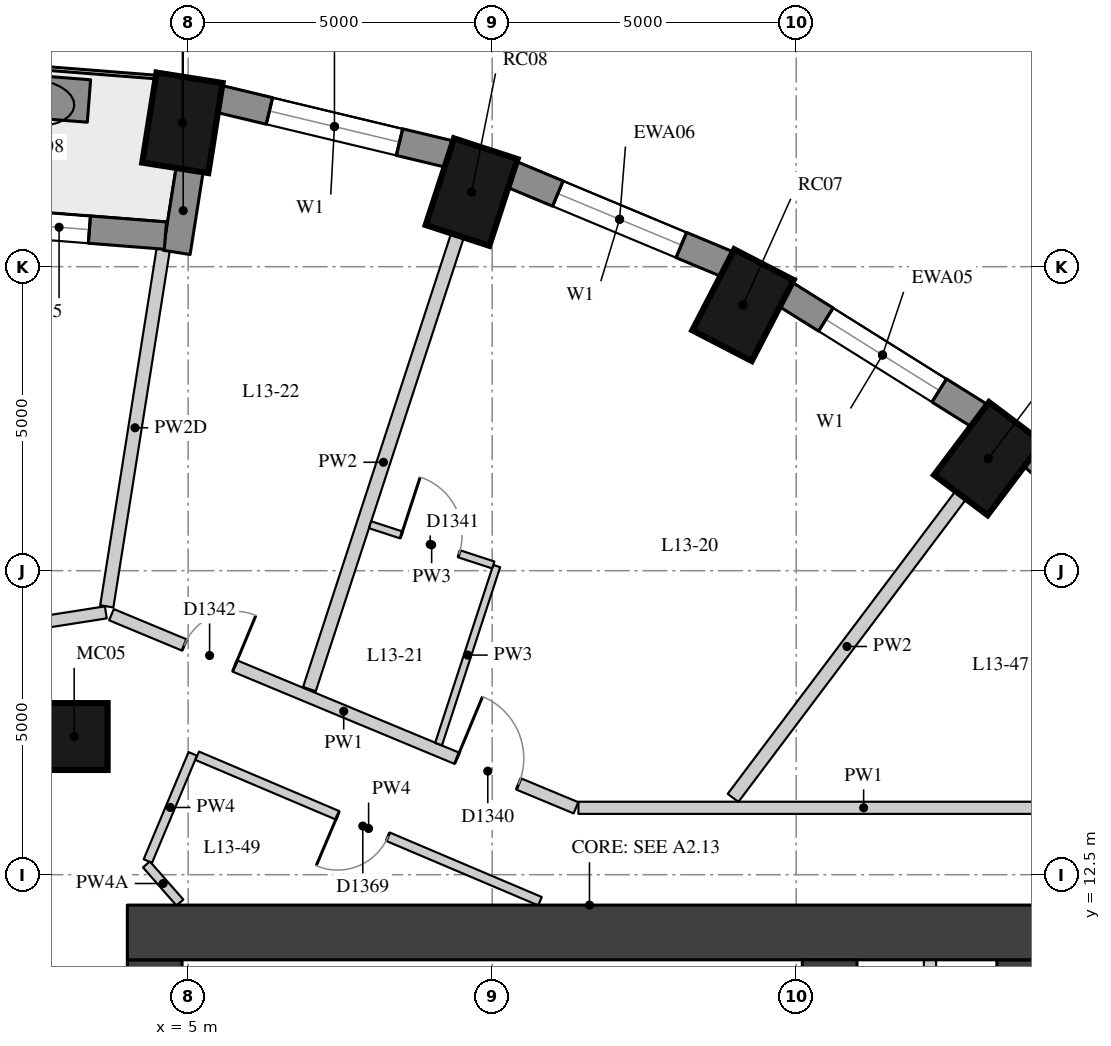
"""IFC4 building model, lengths in metres.
Left out: names, types, materials, properties, quantities, classifications, styles, units other than length and angle.
Written with IfcOpenShell. Run it as: python <this file> out.ifc"""

import sys

from ifc_helpers import new_model, si_unit, direction, frame, frame_2d, origin, origin_2d, place, context, subcontext, project, spatial, rectangle, extrude, element, fill, save


model = new_model("IFC4")
c1 = context("Model", 3, precision=1e-05, world=origin(), true_north=direction((0.0, 1.0)))
c2 = subcontext(c1, "Body", "Model", "MODEL_VIEW")
j1 = project(units=[si_unit("LENGTHUNIT", "METRE"), si_unit("PLANEANGLEUNIT", "RADIAN")], contexts=[c1])
p1 = place(None, origin())
s1 = spatial("IfcSite", under=j1, at=p1, CompositionType="ELEMENT")
p2 = place(p1, origin())
s2 = spatial("IfcBuilding", under=s1, at=p2, CompositionType="ELEMENT")
p3 = place(p2, frame((0.0, 0.0, 51.4)))
s3 = spatial("IfcBuildingStorey", under=s2, at=p3, CompositionType="ELEMENT", Elevation=51.4)
for number, where, z_axis, x_axis in (
    (1, (18.159, 19.343, 0.0), (0.0, 0.0, 1.0), (0.601, 0.799, 0.0)),
    (2, (14.125, 21.867, 0.0), (0.0, 0.0, 1.0), (0.46, 0.888, 0.0)),
    (3, (9.662, 23.727, 0.0), (0.0, 0.0, 1.0), (0.31, 0.951, 0.0)),
    (4, (4.906, 24.866, 0.0), (0.0, 0.0, 1.0), (0.156, 0.988, 0.0)),
):
    element("IfcColumn", number, at=place(p3, frame(where, z_axis=z_axis, x_axis=x_axis)), inside=s3, PredefinedType="COLUMN", context=c2, shape_type="SweptSolid", body=[
        extrude(rectangle(XDim=1.5, YDim=1.1, at=origin_2d()), origin(), (0.0, 0.0, 1.0), 3.3),
    ])
p4 = place(p3, frame((3.126, 14.772, 0.0), z_axis=(0.0, 0.0, 1.0), x_axis=(1.0, 0.0, 0.0)))
e5 = element("IfcColumn", 5, at=p4, inside=s3, PredefinedType="COLUMN", context=c2, shape_type="SweptSolid", body=[
    extrude(rectangle(XDim=1.1, YDim=1.1, at=origin_2d()), origin(), (0.0, 0.0, 1.0), 3.3),
])
p5 = place(p3, frame((21.627, 16.943, 0.0), z_axis=(0.0, 0.0, 1.0), x_axis=(-0.745526233716, 0.66647628228, 0.0)))
e6 = element("IfcWall", 6, at=p5, inside=s3, PredefinedType="SOLIDWALL", context=c2, shape_type="SweptSolid", body=[
    extrude(rectangle(XDim=3.697, YDim=0.45, at=frame_2d((1.848, 0.0))), origin(), (0.0, 0.0, 1.0), 3.02),
])
p6 = place(p3, frame((18.023, 20.044, 0.0), z_axis=(0.0, 0.0, 1.0), x_axis=(-0.847635480093, 0.530579016629, 0.0)))
e7 = element("IfcWall", 7, at=p6, inside=s3, PredefinedType="SOLIDWALL", context=c2, shape_type="SweptSolid", body=[
    extrude(rectangle(XDim=3.782, YDim=0.45, at=frame_2d((1.891, 0.0))), origin(), (0.0, 0.0, 1.0), 3.02),
])
p7 = place(p6, frame((0.791, 0.0, 0.4)))
e8 = element("IfcOpeningElement", 8, at=p7, cuts=e7, PredefinedType="OPENING", context=c2, shape_type="SweptSolid", body=[
    extrude(rectangle(XDim=2.2, YDim=1.75, at=frame_2d((1.1, 0.875))), frame((0.0, 0.235, 0.0), z_axis=(0.0, -1.0, 0.0), x_axis=(1.0, 0.0, 0.0)), (0.0, 0.0, 1.0), 0.47),
])
p8 = place(p3, frame((13.875, 22.537, 0.0), z_axis=(0.0, 0.0, 1.0), x_axis=(-0.923031964282, 0.384723267966, 0.0)))
e9 = element("IfcWall", 9, at=p8, inside=s3, PredefinedType="SOLIDWALL", context=c2, shape_type="SweptSolid", body=[
    extrude(rectangle(XDim=3.856, YDim=0.45, at=frame_2d((1.928, 0.0))), origin(), (0.0, 0.0, 1.0), 3.02),
])
p9 = place(p8, frame((0.828, 0.0, 0.4)))
e10 = element("IfcOpeningElement", 10, at=p9, cuts=e9, PredefinedType="OPENING", context=c2, shape_type="SweptSolid", body=[
    extrude(rectangle(XDim=2.2, YDim=1.75, at=frame_2d((1.1, 0.875))), frame((0.0, 0.235, 0.0), z_axis=(0.0, -1.0, 0.0), x_axis=(1.0, 0.0, 0.0)), (0.0, 0.0, 1.0), 0.47),
])
p10 = place(p3, frame((9.308, 24.35, 0.0), z_axis=(0.0, 0.0, 1.0), x_axis=(-0.972496561493, 0.232917233979, 0.0)))
e11 = element("IfcWall", 11, at=p10, inside=s3, PredefinedType="SOLIDWALL", context=c2, shape_type="SweptSolid", body=[
    extrude(rectangle(XDim=3.911, YDim=0.45, at=frame_2d((1.956, 0.0))), origin(), (0.0, 0.0, 1.0), 3.02),
])
p11 = place(p10, frame((0.855, 0.0, 0.4)))
e12 = element("IfcOpeningElement", 12, at=p11, cuts=e11, PredefinedType="OPENING", context=c2, shape_type="SweptSolid", body=[
    extrude(rectangle(XDim=2.2, YDim=1.75, at=frame_2d((1.1, 0.875))), frame((0.0, 0.235, 0.0), z_axis=(0.0, -1.0, 0.0), x_axis=(1.0, 0.0, 0.0)), (0.0, 0.0, 1.0), 0.47),
])
p12 = place(p3, frame((5.027, 24.108, 0.0), z_axis=(0.0, 0.0, 1.0), x_axis=(-0.156133927791, -0.98773589415, 0.0)))
e13 = element("IfcWall", 13, at=p12, inside=s3, PredefinedType="SOLIDWALL", context=c2, shape_type="SweptSolid", body=[
    extrude(rectangle(XDim=1.39, YDim=0.45, at=frame_2d((0.695, 0.0))), origin(), (0.0, 0.0, 1.0), 2.47),
])
p13 = place(p3, frame((4.626, 23.011, 0.0), z_axis=(0.0, 0.0, 1.0), x_axis=(-0.996937095772, 0.078207589615, 0.0)))
e14 = element("IfcWall", 14, at=p13, inside=s3, PredefinedType="SOLIDWALL", context=c2, shape_type="SweptSolid", body=[
    extrude(rectangle(XDim=4.657, YDim=0.45, at=frame_2d((2.329, 0.0))), origin(), (0.0, 0.0, 1.0), 3.02),
])
p14 = place(p13, frame((1.254, 0.0, 0.4)))
e15 = element("IfcOpeningElement", 15, at=p14, cuts=e14, PredefinedType="OPENING", context=c2, shape_type="SweptSolid", body=[
    extrude(rectangle(XDim=1.0, YDim=1.75, at=frame_2d((0.5, 0.875))), frame((0.0, 0.235, 0.0), z_axis=(0.0, -1.0, 0.0), x_axis=(1.0, 0.0, 0.0)), (0.0, 0.0, 1.0), 0.47),
])
p15 = place(p13, frame((2.404, 0.0, 0.0)))
e16 = element("IfcOpeningElement", 16, at=p15, cuts=e14, PredefinedType="OPENING", context=c2, shape_type="SweptSolid", body=[
    extrude(rectangle(XDim=1.0, YDim=2.15, at=frame_2d((0.5, 1.075))), frame((0.0, 0.235, 0.0), z_axis=(0.0, -1.0, 0.0), x_axis=(1.0, 0.0, 0.0)), (0.0, 0.0, 1.0), 0.47),
])
p16 = place(p3, frame((3.369, 25.225, 0.0), z_axis=(0.0, 0.0, 1.0), x_axis=(-0.996965267018, 0.077847648384, 0.0)))
e17 = element("IfcWall", 17, at=p16, inside=s3, PredefinedType="USERDEFINED", context=c2, shape_type="SweptSolid", body=[
    extrude(rectangle(XDim=1.8, YDim=0.7, at=frame_2d((0.9, 0.0))), origin(), (0.0, 0.0, 1.0), 0.75),
])
p17 = place(p3, frame((4.45, -11.1, 0.0), z_axis=(0.0, 0.0, 1.0), x_axis=(0.0, 1.0, 0.0)))
e18 = element("IfcWall", 18, at=p17, inside=s3, PredefinedType="SHEAR", context=c2, shape_type="SweptSolid", body=[
    extrude(rectangle(XDim=22.2, YDim=0.9, at=frame_2d((11.1, 0.0))), origin(), (0.0, 0.0, 1.0), 3.02),
])
p18 = place(p17, frame((2.35, 0.0, 0.0)))
e19 = element("IfcOpeningElement", 19, at=p18, cuts=e18, PredefinedType="OPENING", context=c2, shape_type="SweptSolid", body=[
    extrude(rectangle(XDim=1.5, YDim=2.1, at=frame_2d((0.75, 1.05))), frame((0.0, 0.46, 0.0), z_axis=(0.0, -1.0, 0.0), x_axis=(1.0, 0.0, 0.0)), (0.0, 0.0, 1.0), 0.92),
])
p19 = place(p17, frame((5.45, 0.0, 0.0)))
e20 = element("IfcOpeningElement", 20, at=p19, cuts=e18, PredefinedType="OPENING", context=c2, shape_type="SweptSolid", body=[
    extrude(rectangle(XDim=1.8, YDim=2.1, at=frame_2d((0.9, 1.05))), frame((0.0, 0.46, 0.0), z_axis=(0.0, -1.0, 0.0), x_axis=(1.0, 0.0, 0.0)), (0.0, 0.0, 1.0), 0.92),
])
p20 = place(p17, frame((7.95, 0.0, 0.0)))
e21 = element("IfcOpeningElement", 21, at=p20, cuts=e18, PredefinedType="OPENING", context=c2, shape_type="SweptSolid", body=[
    extrude(rectangle(XDim=1.1, YDim=2.1, at=frame_2d((0.55, 1.05))), frame((0.0, 0.46, 0.0), z_axis=(0.0, -1.0, 0.0), x_axis=(1.0, 0.0, 0.0)), (0.0, 0.0, 1.0), 0.92),
])
p21 = place(p17, frame((10.6, 0.0, 0.0)))
e22 = element("IfcOpeningElement", 22, at=p21, cuts=e18, PredefinedType="OPENING", context=c2, shape_type="SweptSolid", body=[
    extrude(rectangle(XDim=1.0, YDim=2.1, at=frame_2d((0.5, 1.05))), frame((0.0, 0.46, 0.0), z_axis=(0.0, -1.0, 0.0), x_axis=(1.0, 0.0, 0.0)), (0.0, 0.0, 1.0), 0.92),
])
p22 = place(p17, frame((13.15, 0.0, 0.0)))
e23 = element("IfcOpeningElement", 23, at=p22, cuts=e18, PredefinedType="OPENING", context=c2, shape_type="SweptSolid", body=[
    extrude(rectangle(XDim=1.1, YDim=2.1, at=frame_2d((0.55, 1.05))), frame((0.0, 0.46, 0.0), z_axis=(0.0, -1.0, 0.0), x_axis=(1.0, 0.0, 0.0)), (0.0, 0.0, 1.0), 0.92),
])
p23 = place(p17, frame((14.95, 0.0, 0.0)))
e24 = element("IfcOpeningElement", 24, at=p23, cuts=e18, PredefinedType="OPENING", context=c2, shape_type="SweptSolid", body=[
    extrude(rectangle(XDim=1.8, YDim=2.1, at=frame_2d((0.9, 1.05))), frame((0.0, 0.46, 0.0), z_axis=(0.0, -1.0, 0.0), x_axis=(1.0, 0.0, 0.0)), (0.0, 0.0, 1.0), 0.92),
])
p24 = place(p17, frame((18.35, 0.0, 0.0)))
e25 = element("IfcOpeningElement", 25, at=p24, cuts=e18, PredefinedType="OPENING", context=c2, shape_type="SweptSolid", body=[
    extrude(rectangle(XDim=1.5, YDim=2.1, at=frame_2d((0.75, 1.05))), frame((0.0, 0.46, 0.0), z_axis=(0.0, -1.0, 0.0), x_axis=(1.0, 0.0, 0.0)), (0.0, 0.0, 1.0), 0.92),
])
p25 = place(p3, frame((18.75, -11.1, 0.0), z_axis=(0.0, 0.0, 1.0), x_axis=(0.0, 1.0, 0.0)))
e26 = element("IfcWall", 26, at=p25, inside=s3, PredefinedType="SHEAR", context=c2, shape_type="SweptSolid", body=[
    extrude(rectangle(XDim=22.2, YDim=0.9, at=frame_2d((11.1, 0.0))), origin(), (0.0, 0.0, 1.0), 3.02),
])
p26 = place(p25, frame((15.925, 0.0, 0.0)))
e27 = element("IfcOpeningElement", 27, at=p26, cuts=e26, PredefinedType="OPENING", context=c2, shape_type="SweptSolid", body=[
    extrude(rectangle(XDim=1.5, YDim=2.1, at=frame_2d((0.75, 1.05))), frame((0.0, 0.46, 0.0), z_axis=(0.0, -1.0, 0.0), x_axis=(1.0, 0.0, 0.0)), (0.0, 0.0, 1.0), 0.92),
])
p27 = place(p25, frame((4.525, 0.0, 0.0)))
e28 = element("IfcOpeningElement", 28, at=p27, cuts=e26, PredefinedType="OPENING", context=c2, shape_type="SweptSolid", body=[
    extrude(rectangle(XDim=1.5, YDim=2.1, at=frame_2d((0.75, 1.05))), frame((0.0, 0.46, 0.0), z_axis=(0.0, -1.0, 0.0), x_axis=(1.0, 0.0, 0.0)), (0.0, 0.0, 1.0), 0.92),
])
p28 = place(p3, frame((4.0, 11.55, 0.0), z_axis=(0.0, 0.0, 1.0), x_axis=(1.0, 0.0, 0.0)))
e29 = element("IfcWall", 29, at=p28, inside=s3, PredefinedType="SHEAR", context=c2, shape_type="SweptSolid", body=[
    extrude(rectangle(XDim=15.2, YDim=0.9, at=frame_2d((7.6, 0.0))), origin(), (0.0, 0.0, 1.0), 3.02),
])
p29 = place(p3, frame((15.55, -11.1, 0.0), z_axis=(0.0, 0.0, 1.0), x_axis=(0.0, 1.0, 0.0)))
e30 = element("IfcWall", 30, at=p29, inside=s3, PredefinedType="SHEAR", context=c2, shape_type="SweptSolid", body=[
    extrude(rectangle(XDim=22.2, YDim=0.9, at=frame_2d((11.1, 0.0))), origin(), (0.0, 0.0, 1.0), 3.02),
])
p30 = place(p29, frame((15.6, 0.0, 0.0)))
e31 = element("IfcOpeningElement", 31, at=p30, cuts=e30, PredefinedType="OPENING", context=c2, shape_type="SweptSolid", body=[
    extrude(rectangle(XDim=1.0, YDim=2.1, at=frame_2d((0.5, 1.05))), frame((0.0, 0.46, 0.0), z_axis=(0.0, -1.0, 0.0), x_axis=(1.0, 0.0, 0.0)), (0.0, 0.0, 1.0), 0.92),
])
p31 = place(p29, frame((5.6, 0.0, 0.0)))
e32 = element("IfcOpeningElement", 32, at=p31, cuts=e30, PredefinedType="OPENING", context=c2, shape_type="SweptSolid", body=[
    extrude(rectangle(XDim=1.0, YDim=2.1, at=frame_2d((0.5, 1.05))), frame((0.0, 0.46, 0.0), z_axis=(0.0, -1.0, 0.0), x_axis=(1.0, 0.0, 0.0)), (0.0, 0.0, 1.0), 0.92),
])
p32 = place(p3, frame((17.2, 6.9, 0.0), z_axis=(0.0, 0.0, 1.0), x_axis=(0.0, 1.0, 0.0)))
e33 = element("IfcWall", 33, at=p32, inside=s3, PredefinedType="PARTITIONING", context=c2, shape_type="SweptSolid", body=[
    extrude(rectangle(XDim=4.2, YDim=0.2, at=frame_2d((2.1, 0.0))), origin(), (0.0, 0.0, 1.0), 3.02),
])
p33 = place(p3, frame((-7.234, 15.11, 0.0), z_axis=(0.0, 0.0, 1.0), x_axis=(0.987957763282, 0.154723811906, 0.0)))
e34 = element("IfcWall", 34, at=p33, inside=s3, PredefinedType="PARTITIONING", context=c2, shape_type="SweptSolid", body=[
    extrude(rectangle(XDim=11.012, YDim=0.2, at=frame_2d((5.506, 0.0))), origin(), (0.0, 0.0, 1.0), 3.02),
])
p34 = place(p33, frame((8.605, 0.0, 0.0)))
e35 = element("IfcOpeningElement", 35, at=p34, cuts=e34, PredefinedType="OPENING", context=c2, shape_type="SweptSolid", body=[
    extrude(rectangle(XDim=0.9, YDim=2.1, at=frame_2d((0.45, 1.05))), frame((0.0, 0.11, 0.0), z_axis=(0.0, -1.0, 0.0), x_axis=(1.0, 0.0, 0.0)), (0.0, 0.0, 1.0), 0.22),
])
p35 = place(p33, frame((5.116, 0.0, 0.0)))
e36 = element("IfcOpeningElement", 36, at=p35, cuts=e34, PredefinedType="OPENING", context=c2, shape_type="SweptSolid", body=[
    extrude(rectangle(XDim=0.9, YDim=2.1, at=frame_2d((0.45, 1.05))), frame((0.0, 0.11, 0.0), z_axis=(0.0, -1.0, 0.0), x_axis=(1.0, 0.0, 0.0)), (0.0, 0.0, 1.0), 0.22),
])
p36 = place(p33, frame((1.626, 0.0, 0.0)))
e37 = element("IfcOpeningElement", 37, at=p36, cuts=e34, PredefinedType="OPENING", context=c2, shape_type="SweptSolid", body=[
    extrude(rectangle(XDim=0.9, YDim=2.1, at=frame_2d((0.45, 1.05))), frame((0.0, 0.11, 0.0), z_axis=(0.0, -1.0, 0.0), x_axis=(1.0, 0.0, 0.0)), (0.0, 0.0, 1.0), 0.22),
])
p37 = place(p3, frame((3.739, 16.776, 0.0), z_axis=(0.0, 0.0, 1.0), x_axis=(0.923364778497, -0.383923802117, 0.0)))
e38 = element("IfcWall", 38, at=p37, inside=s3, PredefinedType="PARTITIONING", context=c2, shape_type="SweptSolid", body=[
    extrude(rectangle(XDim=8.273, YDim=0.2, at=frame_2d((4.137, 0.0))), origin(), (0.0, 0.0, 1.0), 3.02),
])
p38 = place(p37, frame((6.153, 0.0, 0.0)))
e39 = element("IfcOpeningElement", 39, at=p38, cuts=e38, PredefinedType="OPENING", context=c2, shape_type="SweptSolid", body=[
    extrude(rectangle(XDim=1.1, YDim=2.1, at=frame_2d((0.55, 1.05))), frame((0.0, 0.11, 0.0), z_axis=(0.0, -1.0, 0.0), x_axis=(1.0, 0.0, 0.0)), (0.0, 0.0, 1.0), 0.22),
])
p39 = place(p37, frame((1.298, 0.0, 0.0)))
e40 = element("IfcOpeningElement", 40, at=p39, cuts=e38, PredefinedType="OPENING", context=c2, shape_type="SweptSolid", body=[
    extrude(rectangle(XDim=0.9, YDim=2.1, at=frame_2d((0.45, 1.05))), frame((0.0, 0.11, 0.0), z_axis=(0.0, -1.0, 0.0), x_axis=(1.0, 0.0, 0.0)), (0.0, 0.0, 1.0), 0.22),
])
p40 = place(p3, frame((11.418, 13.6, 0.0), z_axis=(0.0, 0.0, 1.0), x_axis=(1.0, 0.0, 0.0)))
e41 = element("IfcWall", 41, at=p40, inside=s3, PredefinedType="PARTITIONING", context=c2, shape_type="SweptSolid", body=[
    extrude(rectangle(XDim=9.382, YDim=0.2, at=frame_2d((4.691, 0.0))), origin(), (0.0, 0.0, 1.0), 3.02),
])
p41 = place(p3, frame((4.865, 12.042, 0.0), z_axis=(0.0, 0.0, 1.0), x_axis=(-0.660014599896, 0.751252772323, 0.0)))
e42 = element("IfcWall", 42, at=p41, inside=s3, PredefinedType="PARTITIONING", context=c2, shape_type="SweptSolid", body=[
    extrude(rectangle(XDim=0.835, YDim=0.15, at=frame_2d((0.417, 0.0))), origin(), (0.0, 0.0, 1.0), 2.57),
])
p42 = place(p3, frame((4.337, 12.724, 0.0), z_axis=(0.0, 0.0, 1.0), x_axis=(0.386537433901, 0.922273718694, 0.0)))
e43 = element("IfcWall", 43, at=p42, inside=s3, PredefinedType="PARTITIONING", context=c2, shape_type="SweptSolid", body=[
    extrude(rectangle(XDim=1.911, YDim=0.15, at=frame_2d((0.956, 0.0))), origin(), (0.0, 0.0, 1.0), 3.02),
])
p43 = place(p3, frame((5.149, 14.456, 0.0), z_axis=(0.0, 0.0, 1.0), x_axis=(0.920541383735, -0.390645057348, 0.0)))
e44 = element("IfcWall", 44, at=p43, inside=s3, PredefinedType="PARTITIONING", context=c2, shape_type="SweptSolid", body=[
    extrude(rectangle(XDim=6.124, YDim=0.15, at=frame_2d((3.062, 0.0))), origin(), (0.0, 0.0, 1.0), 3.02),
])
p44 = place(p43, frame((2.508, 0.0, 0.0)))
e45 = element("IfcOpeningElement", 45, at=p44, cuts=e44, PredefinedType="OPENING", context=c2, shape_type="SweptSolid", body=[
    extrude(rectangle(XDim=0.9, YDim=2.1, at=frame_2d((0.45, 1.05))), frame((0.0, 0.085, 0.0), z_axis=(0.0, -1.0, 0.0), x_axis=(1.0, 0.0, 0.0)), (0.0, 0.0, 1.0), 0.17),
])
p45 = place(p3, frame((17.708, 18.743, 0.0), z_axis=(0.0, 0.0, 1.0), x_axis=(-0.601177883261, -0.799115231164, 0.0)))
e46 = element("IfcWall", 46, at=p45, inside=s3, PredefinedType="PARTITIONING", context=c2, shape_type="SweptSolid", body=[
    extrude(rectangle(XDim=6.231, YDim=0.22, at=frame_2d((3.116, 0.0))), origin(), (0.0, 0.0, 1.0), 3.02),
])
p46 = place(p3, frame((9.429, 23.014, 0.0), z_axis=(0.0, 0.0, 1.0), x_axis=(-0.310230839568, -0.950661257326, 0.0)))
e47 = element("IfcWall", 47, at=p46, inside=s3, PredefinedType="PARTITIONING", context=c2, shape_type="SweptSolid", body=[
    extrude(rectangle(XDim=7.849, YDim=0.22, at=frame_2d((3.925, 0.0))), origin(), (0.0, 0.0, 1.0), 3.02),
])
p47 = place(p3, frame((4.591, 22.789, 0.0), z_axis=(0.0, 0.0, 1.0), x_axis=(-0.156126964527, -0.987736994826, 0.0)))
e48 = element("IfcWall", 48, at=p47, inside=s3, PredefinedType="PARTITIONING", context=c2, shape_type="SweptSolid", body=[
    extrude(rectangle(XDim=5.948, YDim=0.22, at=frame_2d((2.974, 0.0))), origin(), (0.0, 0.0, 1.0), 2.47),
])
p48 = place(p3, frame((9.118, 14.648, 0.0), z_axis=(0.0, 0.0, 1.0), x_axis=(0.310277544614, 0.950646014723, 0.0)))
e49 = element("IfcWall", 49, at=p48, inside=s3, PredefinedType="PARTITIONING", context=c2, shape_type="SweptSolid", body=[
    extrude(rectangle(XDim=3.081, YDim=0.12, at=frame_2d((1.54, 0.0))), origin(), (0.0, 0.0, 1.0), 3.02),
])
p49 = place(p3, frame((10.017, 17.594, 0.0), z_axis=(0.0, 0.0, 1.0), x_axis=(-0.950613738429, 0.310376417129, 0.0)))
e50 = element("IfcWall", 50, at=p49, inside=s3, PredefinedType="PARTITIONING", context=c2, shape_type="SweptSolid", body=[
    extrude(rectangle(XDim=2.13, YDim=0.12, at=frame_2d((1.065, 0.0))), origin(), (0.0, 0.0, 1.0), 3.02),
])
p50 = place(p49, frame((0.59, 0.0, 0.0)))
e51 = element("IfcOpeningElement", 51, at=p50, cuts=e50, PredefinedType="OPENING", context=c2, shape_type="SweptSolid", body=[
    extrude(rectangle(XDim=1.0, YDim=2.1, at=frame_2d((0.5, 1.05))), frame((0.0, 0.07, 0.0), z_axis=(0.0, -1.0, 0.0), x_axis=(1.0, 0.0, 0.0)), (0.0, 0.0, 1.0), 0.14),
])
p51 = place(p7, origin())
e52 = element("IfcWindow", 52, at=p51, inside=s3, PartitioningType="SINGLE_PANEL", PredefinedType="WINDOW", context=c2, shape_type="SweptSolid", body=[
    extrude(rectangle(XDim=2.2, YDim=1.75, at=frame_2d((1.1, 0.875))), frame((0.0, 0.035, 0.0), z_axis=(0.0, -1.0, 0.0), x_axis=(1.0, 0.0, 0.0)), (0.0, 0.0, 1.0), 0.06),
])
fill(e8, e52)
p52 = place(p9, origin())
e53 = element("IfcWindow", 53, at=p52, inside=s3, PartitioningType="SINGLE_PANEL", PredefinedType="WINDOW", context=c2, shape_type="SweptSolid", body=[
    extrude(rectangle(XDim=2.2, YDim=1.75, at=frame_2d((1.1, 0.875))), frame((0.0, 0.035, 0.0), z_axis=(0.0, -1.0, 0.0), x_axis=(1.0, 0.0, 0.0)), (0.0, 0.0, 1.0), 0.06),
])
fill(e10, e53)
p53 = place(p11, origin())
e54 = element("IfcWindow", 54, at=p53, inside=s3, PartitioningType="SINGLE_PANEL", PredefinedType="WINDOW", context=c2, shape_type="SweptSolid", body=[
    extrude(rectangle(XDim=2.2, YDim=1.75, at=frame_2d((1.1, 0.875))), frame((0.0, 0.035, 0.0), z_axis=(0.0, -1.0, 0.0), x_axis=(1.0, 0.0, 0.0)), (0.0, 0.0, 1.0), 0.06),
])
fill(e12, e54)
p54 = place(p14, origin())
e55 = element("IfcWindow", 55, at=p54, inside=s3, PartitioningType="SINGLE_PANEL", PredefinedType="WINDOW", context=c2, shape_type="SweptSolid", body=[
    extrude(rectangle(XDim=1.0, YDim=1.75, at=frame_2d((0.5, 0.875))), frame((0.0, 0.035, 0.0), z_axis=(0.0, -1.0, 0.0), x_axis=(1.0, 0.0, 0.0)), (0.0, 0.0, 1.0), 0.06),
])
fill(e15, e55)
p55 = place(p38, origin())
e56 = element("IfcDoor", 56, at=p55, inside=s3, OperationType="SINGLE_SWING_LEFT", PredefinedType="DOOR", context=c2, shape_type="SweptSolid", body=[
    extrude(rectangle(XDim=1.1, YDim=2.1, at=frame_2d((0.55, 1.05))), frame((0.0, 0.025, 0.0), z_axis=(0.0, -1.0, 0.0), x_axis=(1.0, 0.0, 0.0)), (0.0, 0.0, 1.0), 0.05),
])
fill(e39, e56)
p56 = place(p50, origin())
e57 = element("IfcDoor", 57, at=p56, inside=s3, OperationType="SINGLE_SWING_LEFT", PredefinedType="DOOR", context=c2, shape_type="SweptSolid", body=[
    extrude(rectangle(XDim=1.0, YDim=2.1, at=frame_2d((0.5, 1.05))), frame((0.0, 0.025, 0.0), z_axis=(0.0, -1.0, 0.0), x_axis=(1.0, 0.0, 0.0)), (0.0, 0.0, 1.0), 0.05),
])
fill(e51, e57)
p57 = place(p39, origin())
e58 = element("IfcDoor", 58, at=p57, inside=s3, OperationType="SINGLE_SWING_RIGHT", PredefinedType="DOOR", context=c2, shape_type="SweptSolid", body=[
    extrude(rectangle(XDim=0.9, YDim=2.1, at=frame_2d((0.45, 1.05))), frame((0.0, 0.025, 0.0), z_axis=(0.0, -1.0, 0.0), x_axis=(1.0, 0.0, 0.0)), (0.0, 0.0, 1.0), 0.05),
])
fill(e40, e58)
p58 = place(p44, origin())
e59 = element("IfcDoor", 59, at=p58, inside=s3, OperationType="SINGLE_SWING_RIGHT", PredefinedType="DOOR", context=c2, shape_type="SweptSolid", body=[
    extrude(rectangle(XDim=0.9, YDim=2.1, at=frame_2d((0.45, 1.05))), frame((0.0, 0.025, 0.0), z_axis=(0.0, -1.0, 0.0), x_axis=(1.0, 0.0, 0.0)), (0.0, 0.0, 1.0), 0.05),
])
fill(e45, e59)
save(model, sys.argv[1])
